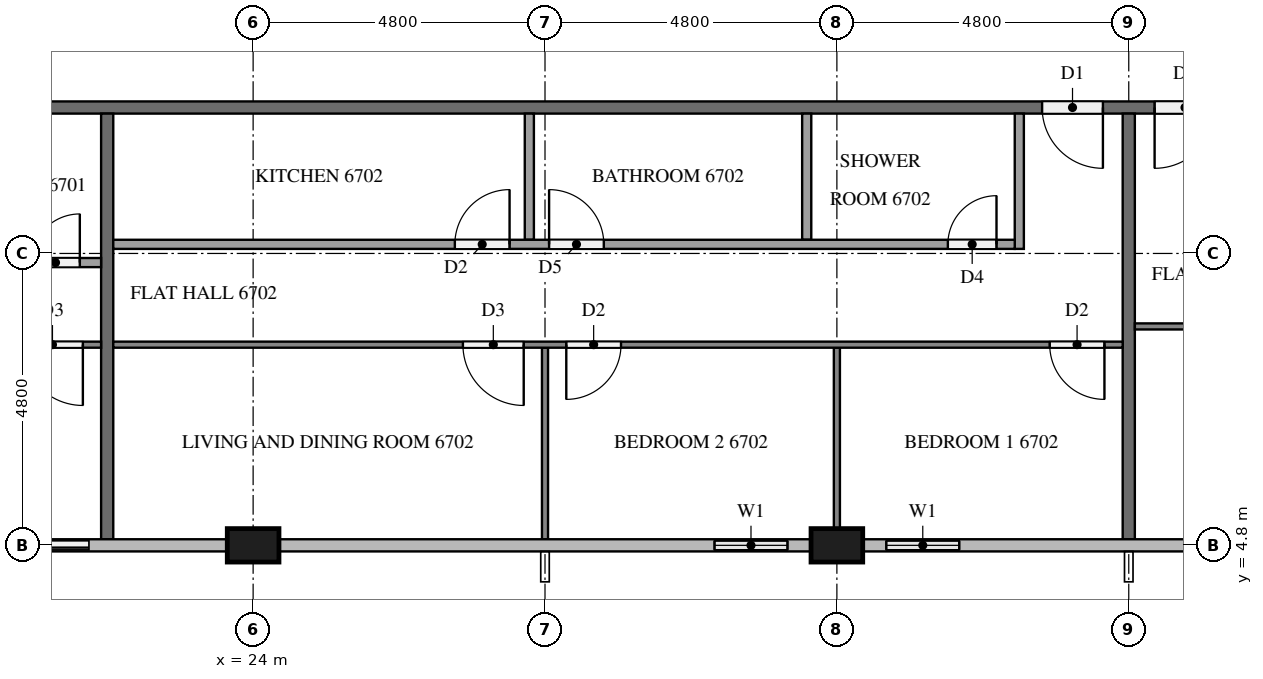
"""IFC4 building model, lengths in metres.
Left out: names, types, materials, properties, quantities, classifications, styles, units other than length and angle.
Written with IfcOpenShell. Run it as: python <this file> out.ifc"""

import sys

from ifc_helpers import new_model, si_unit, direction, frame, frame_2d, origin, origin_2d, place, context, subcontext, project, spatial, rectangle, extrude, element, fill, save


model = new_model("IFC4")
c1 = context("Model", 3, precision=1e-05, world=origin(), true_north=direction((0.0, 1.0)))
c2 = subcontext(c1, "Body", "Model", "MODEL_VIEW")
j1 = project(units=[si_unit("LENGTHUNIT", "METRE"), si_unit("PLANEANGLEUNIT", "RADIAN")], contexts=[c1])
p1 = place(None, origin())
s1 = spatial("IfcSite", under=j1, at=p1, CompositionType="ELEMENT")
p2 = place(p1, origin())
s2 = spatial("IfcBuilding", under=s1, at=p2, CompositionType="ELEMENT")
p3 = place(p2, frame((0.0, 0.0, 256.2)))
s3 = spatial("IfcBuildingStorey", under=s2, at=p3, CompositionType="ELEMENT", Elevation=256.2)
for number, where, z_axis, x_axis in (
    (1, (24.0, 4.8, 0.0), (0.0, 0.0, 1.0), (1.0, 0.0, 0.0)),
    (2, (33.6, 4.8, 0.0), (0.0, 0.0, 1.0), (1.0, 0.0, 0.0)),
):
    element("IfcColumn", number, at=place(p3, frame(where, z_axis=z_axis, x_axis=x_axis)), inside=s3, PredefinedType="COLUMN", context=c2, shape_type="SweptSolid", body=[
        extrude(rectangle(XDim=0.85, YDim=0.55, at=origin_2d()), origin(), (0.0, 0.0, 1.0), 3.2),
    ])
p4 = place(p3, frame((19.2, 4.8, 0.0), z_axis=(0.0, 0.0, 1.0), x_axis=(1.0, 0.0, 0.0)))
e3 = element("IfcWall", 3, at=p4, inside=s3, PredefinedType="SOLIDWALL", context=c2, shape_type="SweptSolid", body=[
    extrude(rectangle(XDim=2.4, YDim=0.15, at=frame_2d((1.2, 0.0))), origin(), (0.0, 0.0, 1.0), 3.2),
])
p5 = place(p4, frame((0.3, 0.0, 0.0)))
e4 = element("IfcOpeningElement", 4, at=p5, cuts=e3, PredefinedType="OPENING", context=c2, shape_type="SweptSolid", body=[
    extrude(rectangle(XDim=1.8, YDim=2.4, at=frame_2d((0.9, 1.2))), frame((0.0, 0.085, 0.0), z_axis=(0.0, -1.0, 0.0), x_axis=(1.0, 0.0, 0.0)), (0.0, 0.0, 1.0), 0.17),
])
p6 = place(p3, frame((31.2, 4.8, 0.0), z_axis=(0.0, 0.0, 1.0), x_axis=(1.0, 0.0, 0.0)))
e5 = element("IfcWall", 5, at=p6, inside=s3, PredefinedType="SOLIDWALL", context=c2, shape_type="SweptSolid", body=[
    extrude(rectangle(XDim=1.975, YDim=0.15, at=frame_2d((0.988, 0.0))), origin(), (0.0, 0.0, 1.0), 3.2),
])
p7 = place(p6, frame((0.387, 0.0, 0.9)))
e6 = element("IfcOpeningElement", 6, at=p7, cuts=e5, PredefinedType="OPENING", context=c2, shape_type="SweptSolid", body=[
    extrude(rectangle(XDim=1.2, YDim=1.4, at=frame_2d((0.6, 0.7))), frame((0.0, 0.085, 0.0), z_axis=(0.0, -1.0, 0.0), x_axis=(1.0, 0.0, 0.0)), (0.0, 0.0, 1.0), 0.17),
])
p8 = place(p3, frame((34.025, 4.8, 0.0), z_axis=(0.0, 0.0, 1.0), x_axis=(1.0, 0.0, 0.0)))
e7 = element("IfcWall", 7, at=p8, inside=s3, PredefinedType="SOLIDWALL", context=c2, shape_type="SweptSolid", body=[
    extrude(rectangle(XDim=1.975, YDim=0.15, at=frame_2d((0.988, 0.0))), origin(), (0.0, 0.0, 1.0), 3.2),
])
p9 = place(p8, frame((0.387, 0.0, 0.9)))
e8 = element("IfcOpeningElement", 8, at=p9, cuts=e7, PredefinedType="OPENING", context=c2, shape_type="SweptSolid", body=[
    extrude(rectangle(XDim=1.2, YDim=1.4, at=frame_2d((0.6, 0.7))), frame((0.0, 0.085, 0.0), z_axis=(0.0, -1.0, 0.0), x_axis=(1.0, 0.0, 0.0)), (0.0, 0.0, 1.0), 0.17),
])
p10 = place(p3, frame((50.5, 12.0, 0.0), z_axis=(0.0, 0.0, 1.0), x_axis=(-1.0, 0.0, 0.0)))
e9 = element("IfcWall", 9, at=p10, inside=s3, PredefinedType="PARTITIONING", context=c2, shape_type="SweptSolid", body=[
    extrude(rectangle(XDim=38.6, YDim=0.2, at=frame_2d((19.3, 0.0))), origin(), (0.0, 0.0, 1.0), 3.2),
])
p11 = place(p10, frame((37.075, 0.0, 0.0)))
e10 = element("IfcOpeningElement", 10, at=p11, cuts=e9, PredefinedType="OPENING", context=c2, shape_type="SweptSolid", body=[
    extrude(rectangle(XDim=1.0, YDim=2.1, at=frame_2d((0.5, 1.05))), frame((0.0, 0.11, 0.0), z_axis=(0.0, -1.0, 0.0), x_axis=(1.0, 0.0, 0.0)), (0.0, 0.0, 1.0), 0.22),
])
p12 = place(p10, frame((12.525, 0.0, 0.0)))
e11 = element("IfcOpeningElement", 11, at=p12, cuts=e9, PredefinedType="OPENING", context=c2, shape_type="SweptSolid", body=[
    extrude(rectangle(XDim=1.0, YDim=2.1, at=frame_2d((0.5, 1.05))), frame((0.0, 0.11, 0.0), z_axis=(0.0, -1.0, 0.0), x_axis=(1.0, 0.0, 0.0)), (0.0, 0.0, 1.0), 0.22),
])
p13 = place(p10, frame((10.675, 0.0, 0.0)))
e12 = element("IfcOpeningElement", 12, at=p13, cuts=e9, PredefinedType="OPENING", context=c2, shape_type="SweptSolid", body=[
    extrude(rectangle(XDim=1.0, YDim=2.1, at=frame_2d((0.5, 1.05))), frame((0.0, 0.11, 0.0), z_axis=(0.0, -1.0, 0.0), x_axis=(1.0, 0.0, 0.0)), (0.0, 0.0, 1.0), 0.22),
])
for number, where, z_axis, x_axis in (
    (13, (21.6, 11.9, 0.0), (0.0, 0.0, 1.0), (0.0, -1.0, 0.0)),
    (14, (38.4, 11.9, 0.0), (0.0, 0.0, 1.0), (0.0, -1.0, 0.0)),
):
    element("IfcWall", number, at=place(p3, frame(where, z_axis=z_axis, x_axis=x_axis)), inside=s3, PredefinedType="PARTITIONING", context=c2, shape_type="SweptSolid", body=[
        extrude(rectangle(XDim=7.0, YDim=0.2, at=frame_2d((3.5, 0.0))), origin(), (0.0, 0.0, 1.0), 3.2),
    ])
p14 = place(p3, frame((21.5, 8.1, 0.0), z_axis=(0.0, 0.0, 1.0), x_axis=(-1.0, 0.0, 0.0)))
e15 = element("IfcWall", 15, at=p14, inside=s3, PredefinedType="PARTITIONING", context=c2, shape_type="SweptSolid", body=[
    extrude(rectangle(XDim=9.4, YDim=0.1, at=frame_2d((4.7, 0.0))), origin(), (0.0, 0.0, 1.0), 3.2),
])
p15 = place(p14, frame((8.2, 0.0, 0.0)))
e16 = element("IfcOpeningElement", 16, at=p15, cuts=e15, PredefinedType="OPENING", context=c2, shape_type="SweptSolid", body=[
    extrude(rectangle(XDim=0.9, YDim=2.1, at=frame_2d((0.45, 1.05))), frame((0.0, 0.06, 0.0), z_axis=(0.0, -1.0, 0.0), x_axis=(1.0, 0.0, 0.0)), (0.0, 0.0, 1.0), 0.12),
])
p16 = place(p14, frame((0.3, 0.0, 0.0)))
e17 = element("IfcOpeningElement", 17, at=p16, cuts=e15, PredefinedType="OPENING", context=c2, shape_type="SweptSolid", body=[
    extrude(rectangle(XDim=1.0, YDim=2.1, at=frame_2d((0.5, 1.05))), frame((0.0, 0.06, 0.0), z_axis=(0.0, -1.0, 0.0), x_axis=(1.0, 0.0, 0.0)), (0.0, 0.0, 1.0), 0.12),
])
p17 = place(p3, frame((13.875, 9.45, 0.0), z_axis=(0.0, 0.0, 1.0), x_axis=(1.0, 0.0, 0.0)))
e18 = element("IfcWall", 18, at=p17, inside=s3, PredefinedType="PARTITIONING", context=c2, shape_type="SweptSolid", body=[
    extrude(rectangle(XDim=7.625, YDim=0.15, at=frame_2d((3.812, 0.0))), origin(), (0.0, 0.0, 1.0), 3.2),
])
p18 = place(p17, frame((0.3, 0.0, 0.0)))
e19 = element("IfcOpeningElement", 19, at=p18, cuts=e18, PredefinedType="OPENING", context=c2, shape_type="SweptSolid", body=[
    extrude(rectangle(XDim=0.9, YDim=2.1, at=frame_2d((0.45, 1.05))), frame((0.0, 0.085, 0.0), z_axis=(0.0, -1.0, 0.0), x_axis=(1.0, 0.0, 0.0)), (0.0, 0.0, 1.0), 0.17),
])
p19 = place(p17, frame((6.475, 0.0, 0.0)))
e20 = element("IfcOpeningElement", 20, at=p19, cuts=e18, PredefinedType="OPENING", context=c2, shape_type="SweptSolid", body=[
    extrude(rectangle(XDim=0.8, YDim=2.1, at=frame_2d((0.4, 1.05))), frame((0.0, 0.085, 0.0), z_axis=(0.0, -1.0, 0.0), x_axis=(1.0, 0.0, 0.0)), (0.0, 0.0, 1.0), 0.17),
])
p20 = place(p3, frame((33.6, 8.05, 0.0), z_axis=(0.0, 0.0, 1.0), x_axis=(0.0, -1.0, 0.0)))
e21 = element("IfcWall", 21, at=p20, inside=s3, PredefinedType="PARTITIONING", context=c2, shape_type="SweptSolid", body=[
    extrude(rectangle(XDim=2.975, YDim=0.1, at=frame_2d((1.488, 0.0))), origin(), (0.0, 0.0, 1.0), 3.2),
])
p21 = place(p3, frame((28.8, 8.05, 0.0), z_axis=(0.0, 0.0, 1.0), x_axis=(0.0, -1.0, 0.0)))
e22 = element("IfcWall", 22, at=p21, inside=s3, PredefinedType="PARTITIONING", context=c2, shape_type="SweptSolid", body=[
    extrude(rectangle(XDim=3.15, YDim=0.1, at=frame_2d((1.575, 0.0))), origin(), (0.0, 0.0, 1.0), 3.2),
])
p22 = place(p3, frame((38.3, 8.1, 0.0), z_axis=(0.0, 0.0, 1.0), x_axis=(-1.0, 0.0, 0.0)))
e23 = element("IfcWall", 23, at=p22, inside=s3, PredefinedType="PARTITIONING", context=c2, shape_type="SweptSolid", body=[
    extrude(rectangle(XDim=16.6, YDim=0.1, at=frame_2d((8.3, 0.0))), origin(), (0.0, 0.0, 1.0), 3.2),
])
p23 = place(p22, frame((0.3, 0.0, 0.0)))
e24 = element("IfcOpeningElement", 24, at=p23, cuts=e23, PredefinedType="OPENING", context=c2, shape_type="SweptSolid", body=[
    extrude(rectangle(XDim=0.9, YDim=2.1, at=frame_2d((0.45, 1.05))), frame((0.0, 0.06, 0.0), z_axis=(0.0, -1.0, 0.0), x_axis=(1.0, 0.0, 0.0)), (0.0, 0.0, 1.0), 0.12),
])
p24 = place(p22, frame((8.25, 0.0, 0.0)))
e25 = element("IfcOpeningElement", 25, at=p24, cuts=e23, PredefinedType="OPENING", context=c2, shape_type="SweptSolid", body=[
    extrude(rectangle(XDim=0.9, YDim=2.1, at=frame_2d((0.45, 1.05))), frame((0.0, 0.06, 0.0), z_axis=(0.0, -1.0, 0.0), x_axis=(1.0, 0.0, 0.0)), (0.0, 0.0, 1.0), 0.12),
])
p25 = place(p22, frame((9.85, 0.0, 0.0)))
e26 = element("IfcOpeningElement", 26, at=p25, cuts=e23, PredefinedType="OPENING", context=c2, shape_type="SweptSolid", body=[
    extrude(rectangle(XDim=1.0, YDim=2.1, at=frame_2d((0.5, 1.05))), frame((0.0, 0.06, 0.0), z_axis=(0.0, -1.0, 0.0), x_axis=(1.0, 0.0, 0.0)), (0.0, 0.0, 1.0), 0.12),
])
for number, where, z_axis, x_axis in (
    (27, (33.104, 11.9, 0.0), (0.0, 0.0, 1.0), (0.0, -1.0, 0.0)),
    (28, (28.542, 11.9, 0.0), (0.0, 0.0, 1.0), (0.0, -1.0, 0.0)),
):
    element("IfcWall", number, at=place(p3, frame(where, z_axis=z_axis, x_axis=x_axis)), inside=s3, PredefinedType="PARTITIONING", context=c2, shape_type="SweptSolid", body=[
        extrude(rectangle(XDim=2.075, YDim=0.15, at=frame_2d((1.038, 0.0))), origin(), (0.0, 0.0, 1.0), 3.2),
    ])
p26 = place(p3, frame((36.6, 11.9, 0.0), z_axis=(0.0, 0.0, 1.0), x_axis=(0.0, -1.0, 0.0)))
e29 = element("IfcWall", 29, at=p26, inside=s3, PredefinedType="PARTITIONING", context=c2, shape_type="SweptSolid", body=[
    extrude(rectangle(XDim=2.225, YDim=0.15, at=frame_2d((1.112, 0.0))), origin(), (0.0, 0.0, 1.0), 3.2),
])
p27 = place(p3, frame((21.7, 9.75, 0.0), z_axis=(0.0, 0.0, 1.0), x_axis=(1.0, 0.0, 0.0)))
e30 = element("IfcWall", 30, at=p27, inside=s3, PredefinedType="PARTITIONING", context=c2, shape_type="SweptSolid", body=[
    extrude(rectangle(XDim=14.825, YDim=0.15, at=frame_2d((7.413, 0.0))), origin(), (0.0, 0.0, 1.0), 3.2),
])
p28 = place(p27, frame((13.725, 0.0, 0.0)))
e31 = element("IfcOpeningElement", 31, at=p28, cuts=e30, PredefinedType="OPENING", context=c2, shape_type="SweptSolid", body=[
    extrude(rectangle(XDim=0.8, YDim=2.1, at=frame_2d((0.4, 1.05))), frame((0.0, 0.085, 0.0), z_axis=(0.0, -1.0, 0.0), x_axis=(1.0, 0.0, 0.0)), (0.0, 0.0, 1.0), 0.17),
])
p29 = place(p27, frame((7.167, 0.0, 0.0)))
e32 = element("IfcOpeningElement", 32, at=p29, cuts=e30, PredefinedType="OPENING", context=c2, shape_type="SweptSolid", body=[
    extrude(rectangle(XDim=0.9, YDim=2.1, at=frame_2d((0.45, 1.05))), frame((0.0, 0.085, 0.0), z_axis=(0.0, -1.0, 0.0), x_axis=(1.0, 0.0, 0.0)), (0.0, 0.0, 1.0), 0.17),
])
p30 = place(p27, frame((5.617, 0.0, 0.0)))
e33 = element("IfcOpeningElement", 33, at=p30, cuts=e30, PredefinedType="OPENING", context=c2, shape_type="SweptSolid", body=[
    extrude(rectangle(XDim=0.9, YDim=2.1, at=frame_2d((0.45, 1.05))), frame((0.0, 0.085, 0.0), z_axis=(0.0, -1.0, 0.0), x_axis=(1.0, 0.0, 0.0)), (0.0, 0.0, 1.0), 0.17),
])
p31 = place(p3, frame((50.3, 8.4, 0.0), z_axis=(0.0, 0.0, 1.0), x_axis=(-1.0, 0.0, 0.0)))
e34 = element("IfcWall", 34, at=p31, inside=s3, PredefinedType="PARTITIONING", context=c2, shape_type="SweptSolid", body=[
    extrude(rectangle(XDim=11.8, YDim=0.1, at=frame_2d((5.9, 0.0))), origin(), (0.0, 0.0, 1.0), 3.2),
])
p32 = place(p31, frame((7.45, 0.0, 0.0)))
e35 = element("IfcOpeningElement", 35, at=p32, cuts=e34, PredefinedType="OPENING", context=c2, shape_type="SweptSolid", body=[
    extrude(rectangle(XDim=0.9, YDim=2.1, at=frame_2d((0.45, 1.05))), frame((0.0, 0.06, 0.0), z_axis=(0.0, -1.0, 0.0), x_axis=(1.0, 0.0, 0.0)), (0.0, 0.0, 1.0), 0.12),
])
p33 = place(p31, frame((5.75, 0.0, 0.0)))
e36 = element("IfcOpeningElement", 36, at=p33, cuts=e34, PredefinedType="OPENING", context=c2, shape_type="SweptSolid", body=[
    extrude(rectangle(XDim=1.0, YDim=2.1, at=frame_2d((0.5, 1.05))), frame((0.0, 0.06, 0.0), z_axis=(0.0, -1.0, 0.0), x_axis=(1.0, 0.0, 0.0)), (0.0, 0.0, 1.0), 0.12),
])
p34 = place(p5, origin())
e37 = element("IfcDoor", 37, at=p34, inside=s3, OperationType="SLIDING_TO_LEFT", PredefinedType="DOOR", context=c2, shape_type="SweptSolid", body=[
    extrude(rectangle(XDim=1.8, YDim=2.4, at=frame_2d((0.9, 1.2))), frame((0.0, 0.025, 0.0), z_axis=(0.0, -1.0, 0.0), x_axis=(1.0, 0.0, 0.0)), (0.0, 0.0, 1.0), 0.05),
])
fill(e4, e37)
p35 = place(p7, origin())
e38 = element("IfcWindow", 38, at=p35, inside=s3, PartitioningType="SINGLE_PANEL", PredefinedType="WINDOW", context=c2, shape_type="SweptSolid", body=[
    extrude(rectangle(XDim=1.2, YDim=1.4, at=frame_2d((0.6, 0.7))), frame((0.0, 0.03, 0.0), z_axis=(0.0, -1.0, 0.0), x_axis=(1.0, 0.0, 0.0)), (0.0, 0.0, 1.0), 0.06),
])
fill(e6, e38)
p36 = place(p9, origin())
e39 = element("IfcWindow", 39, at=p36, inside=s3, PartitioningType="SINGLE_PANEL", PredefinedType="WINDOW", context=c2, shape_type="SweptSolid", body=[
    extrude(rectangle(XDim=1.2, YDim=1.4, at=frame_2d((0.6, 0.7))), frame((0.0, 0.03, 0.0), z_axis=(0.0, -1.0, 0.0), x_axis=(1.0, 0.0, 0.0)), (0.0, 0.0, 1.0), 0.06),
])
fill(e8, e39)
p37 = place(p12, origin())
e40 = element("IfcDoor", 40, at=p37, inside=s3, OperationType="SINGLE_SWING_LEFT", PredefinedType="DOOR", context=c2, shape_type="SweptSolid", body=[
    extrude(rectangle(XDim=1.0, YDim=2.1, at=frame_2d((0.5, 1.05))), frame((0.0, 0.025, 0.0), z_axis=(0.0, -1.0, 0.0), x_axis=(1.0, 0.0, 0.0)), (0.0, 0.0, 1.0), 0.05),
])
fill(e11, e40)
p38 = place(p13, origin())
e41 = element("IfcDoor", 41, at=p38, inside=s3, OperationType="SINGLE_SWING_RIGHT", PredefinedType="DOOR", context=c2, shape_type="SweptSolid", body=[
    extrude(rectangle(XDim=1.0, YDim=2.1, at=frame_2d((0.5, 1.05))), frame((0.0, 0.025, 0.0), z_axis=(0.0, -1.0, 0.0), x_axis=(1.0, 0.0, 0.0)), (0.0, 0.0, 1.0), 0.05),
])
fill(e12, e41)
p39 = place(p16, origin())
e42 = element("IfcDoor", 42, at=p39, inside=s3, OperationType="SINGLE_SWING_LEFT", PredefinedType="DOOR", context=c2, shape_type="SweptSolid", body=[
    extrude(rectangle(XDim=1.0, YDim=2.1, at=frame_2d((0.5, 1.05))), frame((0.0, 0.025, 0.0), z_axis=(0.0, -1.0, 0.0), x_axis=(1.0, 0.0, 0.0)), (0.0, 0.0, 1.0), 0.05),
])
fill(e17, e42)
p40 = place(p19, origin())
e43 = element("IfcDoor", 43, at=p40, inside=s3, OperationType="SINGLE_SWING_RIGHT", PredefinedType="DOOR", context=c2, shape_type="SweptSolid", body=[
    extrude(rectangle(XDim=0.8, YDim=2.1, at=frame_2d((0.4, 1.05))), frame((0.0, 0.025, 0.0), z_axis=(0.0, -1.0, 0.0), x_axis=(1.0, 0.0, 0.0)), (0.0, 0.0, 1.0), 0.05),
])
fill(e20, e43)
p41 = place(p23, origin())
e44 = element("IfcDoor", 44, at=p41, inside=s3, OperationType="SINGLE_SWING_LEFT", PredefinedType="DOOR", context=c2, shape_type="SweptSolid", body=[
    extrude(rectangle(XDim=0.9, YDim=2.1, at=frame_2d((0.45, 1.05))), frame((0.0, 0.025, 0.0), z_axis=(0.0, -1.0, 0.0), x_axis=(1.0, 0.0, 0.0)), (0.0, 0.0, 1.0), 0.05),
])
fill(e24, e44)
p42 = place(p24, origin())
e45 = element("IfcDoor", 45, at=p42, inside=s3, OperationType="SINGLE_SWING_RIGHT", PredefinedType="DOOR", context=c2, shape_type="SweptSolid", body=[
    extrude(rectangle(XDim=0.9, YDim=2.1, at=frame_2d((0.45, 1.05))), frame((0.0, 0.025, 0.0), z_axis=(0.0, -1.0, 0.0), x_axis=(1.0, 0.0, 0.0)), (0.0, 0.0, 1.0), 0.05),
])
fill(e25, e45)
p43 = place(p25, origin())
e46 = element("IfcDoor", 46, at=p43, inside=s3, OperationType="SINGLE_SWING_LEFT", PredefinedType="DOOR", context=c2, shape_type="SweptSolid", body=[
    extrude(rectangle(XDim=1.0, YDim=2.1, at=frame_2d((0.5, 1.05))), frame((0.0, 0.025, 0.0), z_axis=(0.0, -1.0, 0.0), x_axis=(1.0, 0.0, 0.0)), (0.0, 0.0, 1.0), 0.05),
])
fill(e26, e46)
p44 = place(p28, origin())
e47 = element("IfcDoor", 47, at=p44, inside=s3, OperationType="SINGLE_SWING_RIGHT", PredefinedType="DOOR", context=c2, shape_type="SweptSolid", body=[
    extrude(rectangle(XDim=0.8, YDim=2.1, at=frame_2d((0.4, 1.05))), frame((0.0, 0.025, 0.0), z_axis=(0.0, -1.0, 0.0), x_axis=(1.0, 0.0, 0.0)), (0.0, 0.0, 1.0), 0.05),
])
fill(e31, e47)
p45 = place(p29, origin())
e48 = element("IfcDoor", 48, at=p45, inside=s3, OperationType="SINGLE_SWING_LEFT", PredefinedType="DOOR", context=c2, shape_type="SweptSolid", body=[
    extrude(rectangle(XDim=0.9, YDim=2.1, at=frame_2d((0.45, 1.05))), frame((0.0, 0.025, 0.0), z_axis=(0.0, -1.0, 0.0), x_axis=(1.0, 0.0, 0.0)), (0.0, 0.0, 1.0), 0.05),
])
fill(e32, e48)
p46 = place(p30, origin())
e49 = element("IfcDoor", 49, at=p46, inside=s3, OperationType="SINGLE_SWING_RIGHT", PredefinedType="DOOR", context=c2, shape_type="SweptSolid", body=[
    extrude(rectangle(XDim=0.9, YDim=2.1, at=frame_2d((0.45, 1.05))), frame((0.0, 0.025, 0.0), z_axis=(0.0, -1.0, 0.0), x_axis=(1.0, 0.0, 0.0)), (0.0, 0.0, 1.0), 0.05),
])
fill(e33, e49)
save(model, sys.argv[1])
